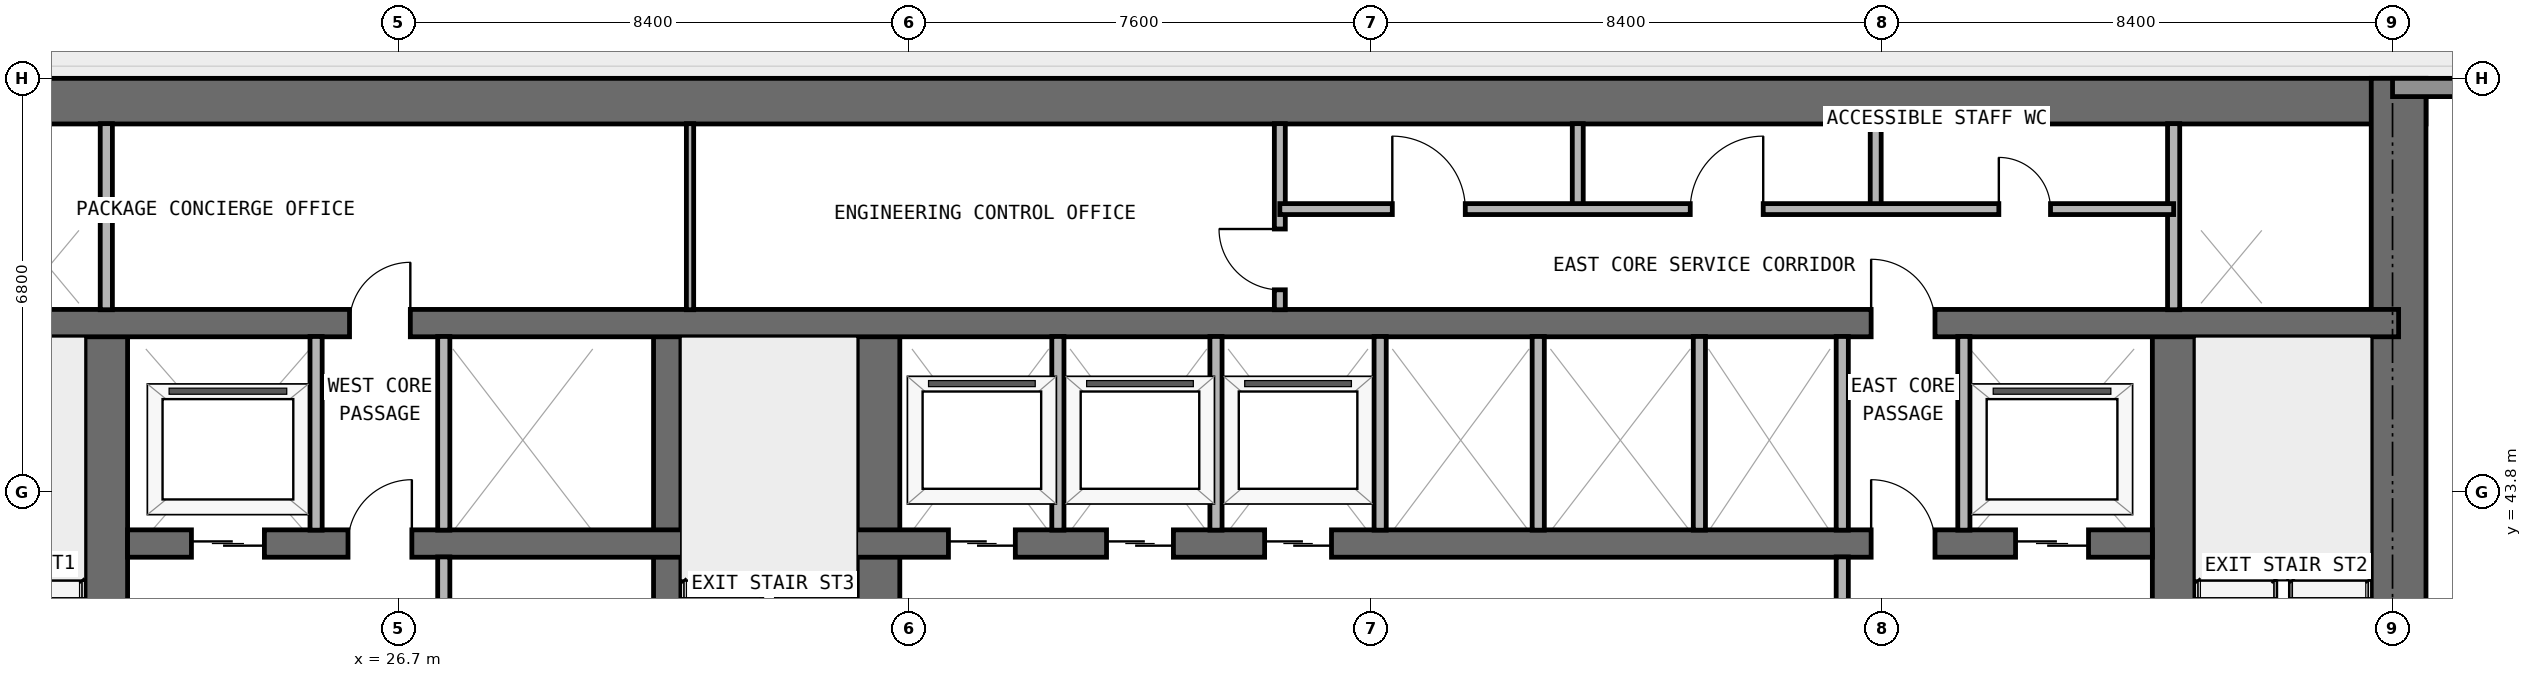
"""IFC4 building model, lengths in metres.
Left out: names, types, materials, properties, quantities, classifications, styles, units other than length and angle.
Written with IfcOpenShell. Run it as: python <this file> out.ifc"""

import sys

from ifc_helpers import new_model, si_unit, direction, frame, frame_2d, origin, place, context, subcontext, project, spatial, rectangle, extrude, element, fill, save


model = new_model("IFC4")
c1 = context("Model", 3, precision=1e-05, world=origin(), true_north=direction((0.0, 1.0)))
c2 = subcontext(c1, "Body", "Model", "MODEL_VIEW")
j1 = project(units=[si_unit("LENGTHUNIT", "METRE"), si_unit("PLANEANGLEUNIT", "RADIAN")], contexts=[c1])
p1 = place(None, origin())
s1 = spatial("IfcSite", under=j1, at=p1, CompositionType="ELEMENT")
p2 = place(p1, origin())
s2 = spatial("IfcBuilding", under=s1, at=p2, CompositionType="ELEMENT")
p3 = place(p2, frame((0.0, 0.0, 15.0)))
s3 = spatial("IfcBuildingStorey", under=s2, at=p3, CompositionType="ELEMENT", Elevation=15.0)
p4 = place(p3, frame((17.75, 50.225, 0.0), z_axis=(0.0, 0.0, 1.0), x_axis=(1.0, 0.0, 0.0)))
e1 = element("IfcWall", 1, at=p4, inside=s3, PredefinedType="SHEAR", context=c2, shape_type="SweptSolid", body=[
    extrude(rectangle(XDim=42.3, YDim=0.75, at=frame_2d((21.15, 0.0))), origin(), (0.0, 0.0, 1.0), 4.5),
])
p5 = place(p3, frame((59.6, 36.45, 0.0), z_axis=(0.0, 0.0, 1.0), x_axis=(0.0, 1.0, 0.0)))
e2 = element("IfcWall", 2, at=p5, inside=s3, PredefinedType="SHEAR", context=c2, shape_type="SweptSolid", body=[
    extrude(rectangle(XDim=14.15, YDim=0.9, at=frame_2d((7.075, 0.0))), origin(), (0.0, 0.0, 1.0), 4.5),
])
p6 = place(p3, frame((21.9, 36.9, 0.0), z_axis=(0.0, 0.0, 1.0), x_axis=(0.0, 1.0, 0.0)))
e3 = element("IfcWall", 3, at=p6, inside=s3, PredefinedType="SHEAR", context=c2, shape_type="SweptSolid", body=[
    extrude(rectangle(XDim=9.675, YDim=0.7, at=frame_2d((4.837, 0.0))), origin(), (0.0, 0.0, 1.0), 4.5),
])
p7 = place(p6, frame((0.65, 0.0, 0.0)))
e4 = element("IfcOpeningElement", 4, at=p7, cuts=e3, PredefinedType="OPENING", context=c2, shape_type="SweptSolid", body=[
    extrude(rectangle(XDim=1.1, YDim=2.15, at=frame_2d((0.55, 1.075))), frame((0.0, 0.36, 0.0), z_axis=(0.0, -1.0, 0.0), x_axis=(1.0, 0.0, 0.0)), (0.0, 0.0, 1.0), 0.72),
])
p8 = place(p3, frame((55.9, 36.9, 0.0), z_axis=(0.0, 0.0, 1.0), x_axis=(0.0, 1.0, 0.0)))
e5 = element("IfcWall", 5, at=p8, inside=s3, PredefinedType="SHEAR", context=c2, shape_type="SweptSolid", body=[
    extrude(rectangle(XDim=9.675, YDim=0.7, at=frame_2d((4.837, 0.0))), origin(), (0.0, 0.0, 1.0), 4.5),
])
p9 = place(p8, frame((0.65, 0.0, 0.0)))
e6 = element("IfcOpeningElement", 6, at=p9, cuts=e5, PredefinedType="OPENING", context=c2, shape_type="SweptSolid", body=[
    extrude(rectangle(XDim=1.1, YDim=2.15, at=frame_2d((0.55, 1.075))), frame((0.0, 0.36, 0.0), z_axis=(0.0, -1.0, 0.0), x_axis=(1.0, 0.0, 0.0)), (0.0, 0.0, 1.0), 0.72),
])
p10 = place(p3, frame((31.125, 36.9, 0.0), z_axis=(0.0, 0.0, 1.0), x_axis=(0.0, 1.0, 0.0)))
e7 = element("IfcWall", 7, at=p10, inside=s3, PredefinedType="SHEAR", context=c2, shape_type="SweptSolid", body=[
    extrude(rectangle(XDim=9.675, YDim=0.45, at=frame_2d((4.837, 0.0))), origin(), (0.0, 0.0, 1.0), 4.5),
])
p11 = place(p3, frame((34.6, 36.9, 0.0), z_axis=(0.0, 0.0, 1.0), x_axis=(0.0, 1.0, 0.0)))
e8 = element("IfcWall", 8, at=p11, inside=s3, PredefinedType="SHEAR", context=c2, shape_type="SweptSolid", body=[
    extrude(rectangle(XDim=9.675, YDim=0.7, at=frame_2d((4.837, 0.0))), origin(), (0.0, 0.0, 1.0), 4.5),
])
p12 = place(p3, frame((22.25, 42.95, 0.0), z_axis=(0.0, 0.0, 1.0), x_axis=(1.0, 0.0, 0.0)))
e9 = element("IfcWall", 9, at=p12, inside=s3, PredefinedType="SHEAR", context=c2, shape_type="SweptSolid", body=[
    extrude(rectangle(XDim=33.3, YDim=0.45, at=frame_2d((16.65, 0.0))), origin(), (0.0, 0.0, 1.0), 4.5),
])
p13 = place(p12, frame((1.05, 0.0, 0.0)))
e10 = element("IfcOpeningElement", 10, at=p13, cuts=e9, PredefinedType="OPENING", context=c2, shape_type="SweptSolid", body=[
    extrude(rectangle(XDim=1.2, YDim=2.2, at=frame_2d((0.6, 1.1))), frame((0.0, 0.235, 0.0), z_axis=(0.0, -1.0, 0.0), x_axis=(1.0, 0.0, 0.0)), (0.0, 0.0, 1.0), 0.47),
])
p14 = place(p12, frame((31.05, 0.0, 0.0)))
e11 = element("IfcOpeningElement", 11, at=p14, cuts=e9, PredefinedType="OPENING", context=c2, shape_type="SweptSolid", body=[
    extrude(rectangle(XDim=1.2, YDim=2.2, at=frame_2d((0.6, 1.1))), frame((0.0, 0.235, 0.0), z_axis=(0.0, -1.0, 0.0), x_axis=(1.0, 0.0, 0.0)), (0.0, 0.0, 1.0), 0.47),
])
p15 = place(p12, frame((13.5, 0.0, 0.0)))
e12 = element("IfcOpeningElement", 12, at=p15, cuts=e9, PredefinedType="OPENING", context=c2, shape_type="SweptSolid", body=[
    extrude(rectangle(XDim=1.1, YDim=2.2, at=frame_2d((0.55, 1.1))), frame((0.0, 0.235, 0.0), z_axis=(0.0, -1.0, 0.0), x_axis=(1.0, 0.0, 0.0)), (0.0, 0.0, 1.0), 0.47),
])
p16 = place(p12, frame((16.1, 0.0, 0.0)))
e13 = element("IfcOpeningElement", 13, at=p16, cuts=e9, PredefinedType="OPENING", context=c2, shape_type="SweptSolid", body=[
    extrude(rectangle(XDim=1.1, YDim=2.2, at=frame_2d((0.55, 1.1))), frame((0.0, 0.235, 0.0), z_axis=(0.0, -1.0, 0.0), x_axis=(1.0, 0.0, 0.0)), (0.0, 0.0, 1.0), 0.47),
])
p17 = place(p12, frame((18.7, 0.0, 0.0)))
e14 = element("IfcOpeningElement", 14, at=p17, cuts=e9, PredefinedType="OPENING", context=c2, shape_type="SweptSolid", body=[
    extrude(rectangle(XDim=1.1, YDim=2.2, at=frame_2d((0.55, 1.1))), frame((0.0, 0.235, 0.0), z_axis=(0.0, -1.0, 0.0), x_axis=(1.0, 0.0, 0.0)), (0.0, 0.0, 1.0), 0.47),
])
p18 = place(p12, frame((3.625, 0.0, 0.0)))
e15 = element("IfcOpeningElement", 15, at=p18, cuts=e9, PredefinedType="OPENING", context=c2, shape_type="SweptSolid", body=[
    extrude(rectangle(XDim=1.05, YDim=2.15, at=frame_2d((0.525, 1.075))), frame((0.0, 0.235, 0.0), z_axis=(0.0, -1.0, 0.0), x_axis=(1.0, 0.0, 0.0)), (0.0, 0.0, 1.0), 0.47),
])
p19 = place(p12, frame((28.675, 0.0, 0.0)))
e16 = element("IfcOpeningElement", 16, at=p19, cuts=e9, PredefinedType="OPENING", context=c2, shape_type="SweptSolid", body=[
    extrude(rectangle(XDim=1.05, YDim=2.15, at=frame_2d((0.525, 1.075))), frame((0.0, 0.235, 0.0), z_axis=(0.0, -1.0, 0.0), x_axis=(1.0, 0.0, 0.0)), (0.0, 0.0, 1.0), 0.47),
])
p20 = place(p3, frame((18.2, 46.575, 0.0), z_axis=(0.0, 0.0, 1.0), x_axis=(1.0, 0.0, 0.0)))
e17 = element("IfcWall", 17, at=p20, inside=s3, PredefinedType="SHEAR", context=c2, shape_type="SweptSolid", body=[
    extrude(rectangle(XDim=41.4, YDim=0.45, at=frame_2d((20.7, 0.0))), origin(), (0.0, 0.0, 1.0), 4.5),
])
p21 = place(p20, frame((7.7, 0.0, 0.0)))
e18 = element("IfcOpeningElement", 18, at=p21, cuts=e17, PredefinedType="OPENING", context=c2, shape_type="SweptSolid", body=[
    extrude(rectangle(XDim=1.0, YDim=2.2, at=frame_2d((0.5, 1.1))), frame((0.0, 0.235, 0.0), z_axis=(0.0, -1.0, 0.0), x_axis=(1.0, 0.0, 0.0)), (0.0, 0.0, 1.0), 0.47),
])
p22 = place(p20, frame((32.725, 0.0, 0.0)))
e19 = element("IfcOpeningElement", 19, at=p22, cuts=e17, PredefinedType="OPENING", context=c2, shape_type="SweptSolid", body=[
    extrude(rectangle(XDim=1.05, YDim=2.15, at=frame_2d((0.525, 1.075))), frame((0.0, 0.235, 0.0), z_axis=(0.0, -1.0, 0.0), x_axis=(1.0, 0.0, 0.0)), (0.0, 0.0, 1.0), 0.47),
])
p23 = place(p3, frame((59.5, 50.45, 0.0), z_axis=(0.0, 0.0, 1.0), x_axis=(1.0, 0.0, 0.0)))
e20 = element("IfcWall", 20, at=p23, inside=s3, PredefinedType="STANDARD", context=c2, shape_type="SweptSolid", body=[
    extrude(rectangle(XDim=17.3, YDim=0.3, at=frame_2d((8.65, 0.0))), origin(), (0.0, 0.0, 1.0), 4.5),
])
p24 = place(p23, frame((7.55, 0.0, 0.85)))
e21 = element("IfcOpeningElement", 21, at=p24, cuts=e20, PredefinedType="OPENING", context=c2, shape_type="SweptSolid", body=[
    extrude(rectangle(XDim=2.2, YDim=1.55, at=frame_2d((1.1, 0.775))), frame((0.0, 0.16, 0.0), z_axis=(0.0, -1.0, 0.0), x_axis=(1.0, 0.0, 0.0)), (0.0, 0.0, 1.0), 0.32),
])
p25 = place(p3, frame((21.9, 46.795, 0.0), z_axis=(0.0, 0.0, 1.0), x_axis=(0.0, 1.0, 0.0)))
e22 = element("IfcWall", 22, at=p25, inside=s3, PredefinedType="PARTITIONING", context=c2, shape_type="SweptSolid", body=[
    extrude(rectangle(XDim=3.06, YDim=0.2, at=frame_2d((1.53, 0.0))), origin(), (0.0, 0.0, 1.0), 4.5),
])
p26 = place(p3, frame((25.35, 43.17, 0.0), z_axis=(0.0, 0.0, 1.0), x_axis=(0.0, 1.0, 0.0)))
e23 = element("IfcWall", 23, at=p26, inside=s3, PredefinedType="PARTITIONING", context=c2, shape_type="SweptSolid", body=[
    extrude(rectangle(XDim=3.185, YDim=0.2, at=frame_2d((1.593, 0.0))), origin(), (0.0, 0.0, 1.0), 4.5),
])
p27 = place(p3, frame((27.45, 37.345, 0.0), z_axis=(0.0, 0.0, 1.0), x_axis=(0.0, 1.0, 0.0)))
e24 = element("IfcWall", 24, at=p27, inside=s3, PredefinedType="PARTITIONING", context=c2, shape_type="SweptSolid", body=[
    extrude(rectangle(XDim=5.385, YDim=0.2, at=frame_2d((2.692, 0.0))), origin(), (0.0, 0.0, 1.0), 4.5),
])
p28 = place(p3, frame((27.45, 43.17, 0.0), z_axis=(0.0, 0.0, 1.0), x_axis=(0.0, 1.0, 0.0)))
e25 = element("IfcWall", 25, at=p28, inside=s3, PredefinedType="PARTITIONING", context=c2, shape_type="SweptSolid", body=[
    extrude(rectangle(XDim=3.185, YDim=0.2, at=frame_2d((1.593, 0.0))), origin(), (0.0, 0.0, 1.0), 4.5),
])
p29 = place(p3, frame((31.5, 46.795, 0.0), z_axis=(0.0, 0.0, 1.0), x_axis=(0.0, 1.0, 0.0)))
e26 = element("IfcWall", 26, at=p29, inside=s3, PredefinedType="PARTITIONING", context=c2, shape_type="SweptSolid", body=[
    extrude(rectangle(XDim=3.06, YDim=0.12, at=frame_2d((1.53, 0.0))), origin(), (0.0, 0.0, 1.0), 4.5),
])
for number, where, z_axis, x_axis in (
    (27, (37.55, 43.17, 0.0), (0.0, 0.0, 1.0), (0.0, 1.0, 0.0)),
    (28, (40.15, 43.17, 0.0), (0.0, 0.0, 1.0), (0.0, 1.0, 0.0)),
):
    element("IfcWall", number, at=place(p3, frame(where, z_axis=z_axis, x_axis=x_axis)), inside=s3, PredefinedType="PARTITIONING", context=c2, shape_type="SweptSolid", body=[
        extrude(rectangle(XDim=3.185, YDim=0.2, at=frame_2d((1.593, 0.0))), origin(), (0.0, 0.0, 1.0), 4.5),
    ])
p30 = place(p3, frame((41.2, 46.795, 0.0), z_axis=(0.0, 0.0, 1.0), x_axis=(0.0, 1.0, 0.0)))
e29 = element("IfcWall", 29, at=p30, inside=s3, PredefinedType="PARTITIONING", context=c2, shape_type="SweptSolid", body=[
    extrude(rectangle(XDim=3.06, YDim=0.18, at=frame_2d((1.53, 0.0))), origin(), (0.0, 0.0, 1.0), 4.5),
])
p31 = place(p30, frame((0.327, 0.0, 0.0)))
e30 = element("IfcOpeningElement", 30, at=p31, cuts=e29, PredefinedType="OPENING", context=c2, shape_type="SweptSolid", body=[
    extrude(rectangle(XDim=1.0, YDim=2.2, at=frame_2d((0.5, 1.1))), frame((0.0, 0.1, 0.0), z_axis=(0.0, -1.0, 0.0), x_axis=(1.0, 0.0, 0.0)), (0.0, 0.0, 1.0), 0.2),
])
for number, where, z_axis, x_axis in (
    (31, (42.85, 43.17, 0.0), (0.0, 0.0, 1.0), (0.0, 1.0, 0.0)),
    (32, (45.45, 43.17, 0.0), (0.0, 0.0, 1.0), (0.0, 1.0, 0.0)),
):
    element("IfcWall", number, at=place(p3, frame(where, z_axis=z_axis, x_axis=x_axis)), inside=s3, PredefinedType="PARTITIONING", context=c2, shape_type="SweptSolid", body=[
        extrude(rectangle(XDim=3.185, YDim=0.2, at=frame_2d((1.593, 0.0))), origin(), (0.0, 0.0, 1.0), 4.5),
    ])
p32 = place(p3, frame((46.1, 48.45, 0.0), z_axis=(0.0, 0.0, 1.0), x_axis=(0.0, 1.0, 0.0)))
e33 = element("IfcWall", 33, at=p32, inside=s3, PredefinedType="PARTITIONING", context=c2, shape_type="SweptSolid", body=[
    extrude(rectangle(XDim=1.405, YDim=0.18, at=frame_2d((0.703, 0.0))), origin(), (0.0, 0.0, 1.0), 4.5),
])
p33 = place(p3, frame((48.1, 43.17, 0.0), z_axis=(0.0, 0.0, 1.0), x_axis=(0.0, 1.0, 0.0)))
e34 = element("IfcWall", 34, at=p33, inside=s3, PredefinedType="PARTITIONING", context=c2, shape_type="SweptSolid", body=[
    extrude(rectangle(XDim=3.185, YDim=0.2, at=frame_2d((1.593, 0.0))), origin(), (0.0, 0.0, 1.0), 4.5),
])
p34 = place(p3, frame((50.45, 37.345, 0.0), z_axis=(0.0, 0.0, 1.0), x_axis=(0.0, 1.0, 0.0)))
e35 = element("IfcWall", 35, at=p34, inside=s3, PredefinedType="PARTITIONING", context=c2, shape_type="SweptSolid", body=[
    extrude(rectangle(XDim=5.385, YDim=0.2, at=frame_2d((2.692, 0.0))), origin(), (0.0, 0.0, 1.0), 4.5),
])
p35 = place(p3, frame((50.45, 43.17, 0.0), z_axis=(0.0, 0.0, 1.0), x_axis=(0.0, 1.0, 0.0)))
e36 = element("IfcWall", 36, at=p35, inside=s3, PredefinedType="PARTITIONING", context=c2, shape_type="SweptSolid", body=[
    extrude(rectangle(XDim=3.185, YDim=0.2, at=frame_2d((1.593, 0.0))), origin(), (0.0, 0.0, 1.0), 4.5),
])
p36 = place(p3, frame((51.0, 48.45, 0.0), z_axis=(0.0, 0.0, 1.0), x_axis=(0.0, 1.0, 0.0)))
e37 = element("IfcWall", 37, at=p36, inside=s3, PredefinedType="PARTITIONING", context=c2, shape_type="SweptSolid", body=[
    extrude(rectangle(XDim=1.405, YDim=0.18, at=frame_2d((0.703, 0.0))), origin(), (0.0, 0.0, 1.0), 4.5),
])
p37 = place(p3, frame((52.45, 43.17, 0.0), z_axis=(0.0, 0.0, 1.0), x_axis=(0.0, 1.0, 0.0)))
e38 = element("IfcWall", 38, at=p37, inside=s3, PredefinedType="PARTITIONING", context=c2, shape_type="SweptSolid", body=[
    extrude(rectangle(XDim=3.185, YDim=0.2, at=frame_2d((1.593, 0.0))), origin(), (0.0, 0.0, 1.0), 4.5),
])
p38 = place(p3, frame((55.9, 46.795, 0.0), z_axis=(0.0, 0.0, 1.0), x_axis=(0.0, 1.0, 0.0)))
e39 = element("IfcWall", 39, at=p38, inside=s3, PredefinedType="PARTITIONING", context=c2, shape_type="SweptSolid", body=[
    extrude(rectangle(XDim=3.06, YDim=0.2, at=frame_2d((1.53, 0.0))), origin(), (0.0, 0.0, 1.0), 4.5),
])
p39 = place(p3, frame((41.2, 48.45, 0.0), z_axis=(0.0, 0.0, 1.0), x_axis=(1.0, 0.0, 0.0)))
e40 = element("IfcWall", 40, at=p39, inside=s3, PredefinedType="PARTITIONING", context=c2, shape_type="SweptSolid", body=[
    extrude(rectangle(XDim=14.7, YDim=0.18, at=frame_2d((7.35, 0.0))), origin(), (0.0, 0.0, 1.0), 4.5),
])
p40 = place(p39, frame((1.85, 0.0, 0.0)))
e41 = element("IfcOpeningElement", 41, at=p40, cuts=e40, PredefinedType="OPENING", context=c2, shape_type="SweptSolid", body=[
    extrude(rectangle(XDim=1.2, YDim=2.2, at=frame_2d((0.6, 1.1))), frame((0.0, 0.1, 0.0), z_axis=(0.0, -1.0, 0.0), x_axis=(1.0, 0.0, 0.0)), (0.0, 0.0, 1.0), 0.2),
])
p41 = place(p39, frame((6.75, 0.0, 0.0)))
e42 = element("IfcOpeningElement", 42, at=p41, cuts=e40, PredefinedType="OPENING", context=c2, shape_type="SweptSolid", body=[
    extrude(rectangle(XDim=1.2, YDim=2.2, at=frame_2d((0.6, 1.1))), frame((0.0, 0.1, 0.0), z_axis=(0.0, -1.0, 0.0), x_axis=(1.0, 0.0, 0.0)), (0.0, 0.0, 1.0), 0.2),
])
p42 = place(p39, frame((11.825, 0.0, 0.0)))
e43 = element("IfcOpeningElement", 43, at=p42, cuts=e40, PredefinedType="OPENING", context=c2, shape_type="SweptSolid", body=[
    extrude(rectangle(XDim=0.85, YDim=2.1, at=frame_2d((0.425, 1.05))), frame((0.0, 0.1, 0.0), z_axis=(0.0, -1.0, 0.0), x_axis=(1.0, 0.0, 0.0)), (0.0, 0.0, 1.0), 0.2),
])
p43 = place(p13, origin())
e44 = element("IfcDoor", 44, at=p43, inside=s3, OperationType="DOUBLE_DOOR_SLIDING", PredefinedType="DOOR", context=c2, shape_type="SweptSolid", body=[
    extrude(rectangle(XDim=1.2, YDim=2.2, at=frame_2d((0.6, 1.1))), frame((0.0, 0.025, 0.0), z_axis=(0.0, -1.0, 0.0), x_axis=(1.0, 0.0, 0.0)), (0.0, 0.0, 1.0), 0.05),
])
fill(e10, e44)
p44 = place(p14, origin())
e45 = element("IfcDoor", 45, at=p44, inside=s3, OperationType="DOUBLE_DOOR_SLIDING", PredefinedType="DOOR", context=c2, shape_type="SweptSolid", body=[
    extrude(rectangle(XDim=1.2, YDim=2.2, at=frame_2d((0.6, 1.1))), frame((0.0, 0.025, 0.0), z_axis=(0.0, -1.0, 0.0), x_axis=(1.0, 0.0, 0.0)), (0.0, 0.0, 1.0), 0.05),
])
fill(e11, e45)
p45 = place(p15, origin())
e46 = element("IfcDoor", 46, at=p45, inside=s3, OperationType="DOUBLE_DOOR_SLIDING", PredefinedType="DOOR", context=c2, shape_type="SweptSolid", body=[
    extrude(rectangle(XDim=1.1, YDim=2.2, at=frame_2d((0.55, 1.1))), frame((0.0, 0.025, 0.0), z_axis=(0.0, -1.0, 0.0), x_axis=(1.0, 0.0, 0.0)), (0.0, 0.0, 1.0), 0.05),
])
fill(e12, e46)
p46 = place(p16, origin())
e47 = element("IfcDoor", 47, at=p46, inside=s3, OperationType="DOUBLE_DOOR_SLIDING", PredefinedType="DOOR", context=c2, shape_type="SweptSolid", body=[
    extrude(rectangle(XDim=1.1, YDim=2.2, at=frame_2d((0.55, 1.1))), frame((0.0, 0.025, 0.0), z_axis=(0.0, -1.0, 0.0), x_axis=(1.0, 0.0, 0.0)), (0.0, 0.0, 1.0), 0.05),
])
fill(e13, e47)
p47 = place(p17, origin())
e48 = element("IfcDoor", 48, at=p47, inside=s3, OperationType="DOUBLE_DOOR_SLIDING", PredefinedType="DOOR", context=c2, shape_type="SweptSolid", body=[
    extrude(rectangle(XDim=1.1, YDim=2.2, at=frame_2d((0.55, 1.1))), frame((0.0, 0.025, 0.0), z_axis=(0.0, -1.0, 0.0), x_axis=(1.0, 0.0, 0.0)), (0.0, 0.0, 1.0), 0.05),
])
fill(e14, e48)
p48 = place(p18, origin())
e49 = element("IfcDoor", 49, at=p48, inside=s3, OperationType="SINGLE_SWING_RIGHT", PredefinedType="DOOR", context=c2, shape_type="SweptSolid", body=[
    extrude(rectangle(XDim=1.05, YDim=2.15, at=frame_2d((0.525, 1.075))), frame((0.0, 0.025, 0.0), z_axis=(0.0, -1.0, 0.0), x_axis=(1.0, 0.0, 0.0)), (0.0, 0.0, 1.0), 0.05),
])
fill(e15, e49)
p49 = place(p19, origin())
e50 = element("IfcDoor", 50, at=p49, inside=s3, OperationType="SINGLE_SWING_LEFT", PredefinedType="DOOR", context=c2, shape_type="SweptSolid", body=[
    extrude(rectangle(XDim=1.05, YDim=2.15, at=frame_2d((0.525, 1.075))), frame((0.0, 0.025, 0.0), z_axis=(0.0, -1.0, 0.0), x_axis=(1.0, 0.0, 0.0)), (0.0, 0.0, 1.0), 0.05),
])
fill(e16, e50)
p50 = place(p21, origin())
e51 = element("IfcDoor", 51, at=p50, inside=s3, OperationType="SINGLE_SWING_RIGHT", PredefinedType="DOOR", context=c2, shape_type="SweptSolid", body=[
    extrude(rectangle(XDim=1.0, YDim=2.2, at=frame_2d((0.5, 1.1))), frame((0.0, 0.025, 0.0), z_axis=(0.0, -1.0, 0.0), x_axis=(1.0, 0.0, 0.0)), (0.0, 0.0, 1.0), 0.05),
])
fill(e18, e51)
p51 = place(p22, origin())
e52 = element("IfcDoor", 52, at=p51, inside=s3, OperationType="SINGLE_SWING_LEFT", PredefinedType="DOOR", context=c2, shape_type="SweptSolid", body=[
    extrude(rectangle(XDim=1.05, YDim=2.15, at=frame_2d((0.525, 1.075))), frame((0.0, 0.025, 0.0), z_axis=(0.0, -1.0, 0.0), x_axis=(1.0, 0.0, 0.0)), (0.0, 0.0, 1.0), 0.05),
])
fill(e19, e52)
p52 = place(p31, origin())
e53 = element("IfcDoor", 53, at=p52, inside=s3, OperationType="SINGLE_SWING_RIGHT", PredefinedType="DOOR", context=c2, shape_type="SweptSolid", body=[
    extrude(rectangle(XDim=1.0, YDim=2.2, at=frame_2d((0.5, 1.1))), frame((0.0, 0.025, 0.0), z_axis=(0.0, -1.0, 0.0), x_axis=(1.0, 0.0, 0.0)), (0.0, 0.0, 1.0), 0.05),
])
fill(e30, e53)
p53 = place(p40, origin())
e54 = element("IfcDoor", 54, at=p53, inside=s3, OperationType="SINGLE_SWING_LEFT", PredefinedType="DOOR", context=c2, shape_type="SweptSolid", body=[
    extrude(rectangle(XDim=1.2, YDim=2.2, at=frame_2d((0.6, 1.1))), frame((0.0, 0.025, 0.0), z_axis=(0.0, -1.0, 0.0), x_axis=(1.0, 0.0, 0.0)), (0.0, 0.0, 1.0), 0.05),
])
fill(e41, e54)
p54 = place(p41, origin())
e55 = element("IfcDoor", 55, at=p54, inside=s3, OperationType="SINGLE_SWING_RIGHT", PredefinedType="DOOR", context=c2, shape_type="SweptSolid", body=[
    extrude(rectangle(XDim=1.2, YDim=2.2, at=frame_2d((0.6, 1.1))), frame((0.0, 0.025, 0.0), z_axis=(0.0, -1.0, 0.0), x_axis=(1.0, 0.0, 0.0)), (0.0, 0.0, 1.0), 0.05),
])
fill(e42, e55)
p55 = place(p42, origin())
e56 = element("IfcDoor", 56, at=p55, inside=s3, OperationType="SINGLE_SWING_LEFT", PredefinedType="DOOR", context=c2, shape_type="SweptSolid", body=[
    extrude(rectangle(XDim=0.85, YDim=2.1, at=frame_2d((0.425, 1.05))), frame((0.0, 0.025, 0.0), z_axis=(0.0, -1.0, 0.0), x_axis=(1.0, 0.0, 0.0)), (0.0, 0.0, 1.0), 0.05),
])
fill(e43, e56)
save(model, sys.argv[1])
